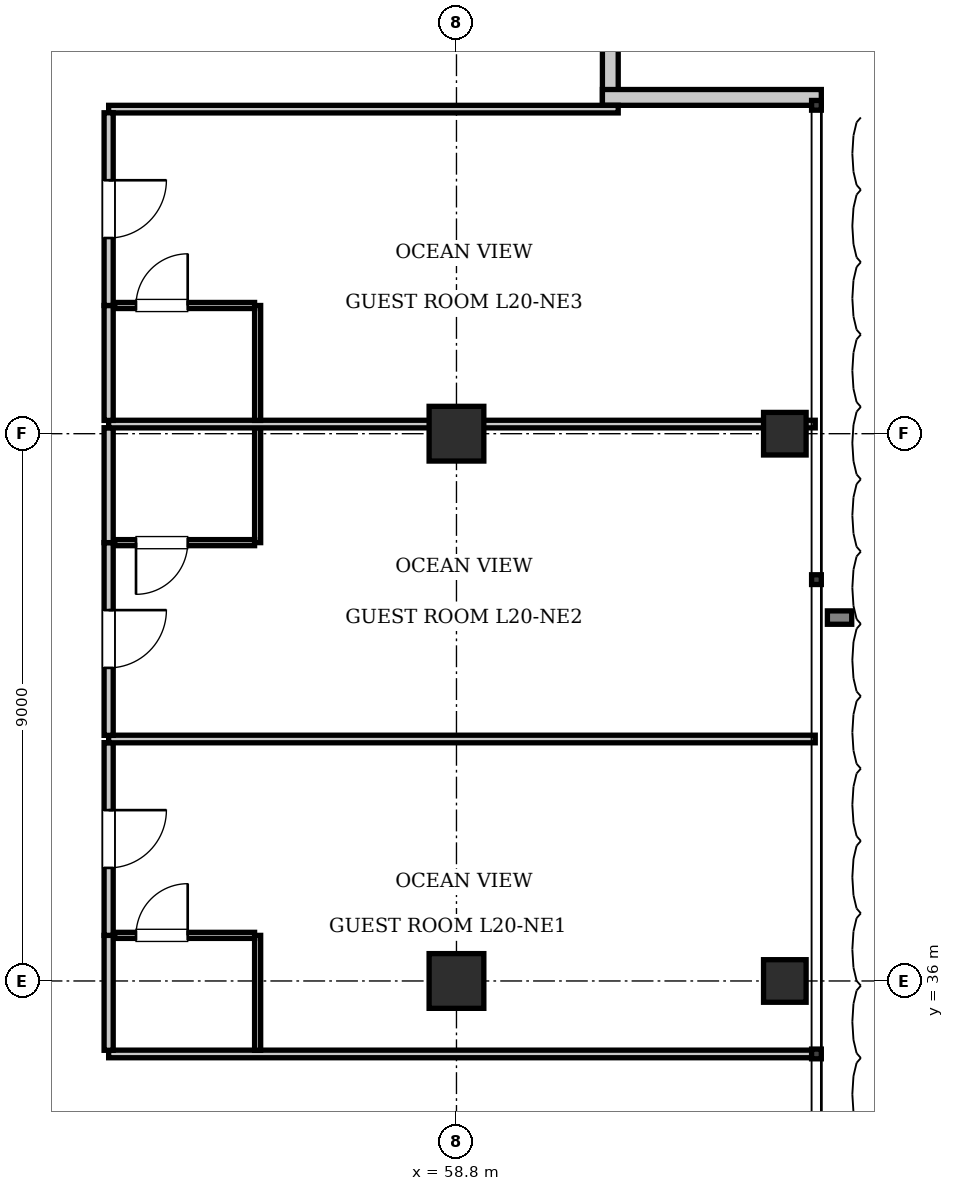
"""IFC4 building model, lengths in metres.
Left out: names, types, materials, properties, quantities, classifications, styles, units other than length and angle.
Written with IfcOpenShell. Run it as: python <this file> out.ifc"""

import sys

from ifc_helpers import new_model, si_unit, direction, frame, frame_2d, origin, origin_2d, place, context, subcontext, project, spatial, rectangle, i_section, extrude, element, fill, save


model = new_model("IFC4")
c1 = context("Model", 3, precision=1e-05, world=origin(), true_north=direction((0.0, 1.0)))
c2 = subcontext(c1, "Body", "Model", "MODEL_VIEW")
j1 = project(units=[si_unit("LENGTHUNIT", "METRE"), si_unit("PLANEANGLEUNIT", "RADIAN")], contexts=[c1])
p1 = place(None, origin())
s1 = spatial("IfcSite", under=j1, at=p1, CompositionType="ELEMENT")
p2 = place(p1, origin())
s2 = spatial("IfcBuilding", under=s1, at=p2, CompositionType="ELEMENT")
p3 = place(p2, frame((0.0, 0.0, 84.7)))
s3 = spatial("IfcBuildingStorey", under=s2, at=p3, CompositionType="ELEMENT", Elevation=84.7)
for number, where, z_axis, x_axis in (
    (1, (58.8, 36.0, 0.0), (0.0, 0.0, 1.0), (1.0, 0.0, 0.0)),
    (2, (58.8, 45.0, 0.0), (0.0, 0.0, 1.0), (1.0, 0.0, 0.0)),
):
    element("IfcColumn", number, at=place(p3, frame(where, z_axis=z_axis, x_axis=x_axis)), inside=s3, PredefinedType="COLUMN", context=c2, shape_type="SweptSolid", body=[
        extrude(rectangle(XDim=0.9, YDim=0.9, at=origin_2d()), origin(), (0.0, 0.0, 1.0), 3.85),
    ])
for number, where, z_axis, x_axis in (
    (3, (64.2, 36.0, 0.0), (0.0, 0.0, 1.0), (1.0, 0.0, 0.0)),
    (4, (64.2, 45.0, 0.0), (0.0, 0.0, 1.0), (1.0, 0.0, 0.0)),
):
    element("IfcColumn", number, at=place(p3, frame(where, z_axis=z_axis, x_axis=x_axis)), inside=s3, PredefinedType="COLUMN", context=c2, shape_type="SweptSolid", body=[
        extrude(i_section(OverallWidth=0.7, OverallDepth=0.7, WebThickness=0.028, FlangeThickness=0.044, at=origin_2d()), origin(), (0.0, 0.0, 1.0), 3.85),
    ])
for number, where, z_axis, x_axis in (
    (5, (61.33, 54.0, 0.0), (0.0, 0.0, 1.0), (0.0, -1.0, 0.0)),
    (6, (61.2, 50.53, 0.0), (0.0, 0.0, 1.0), (1.0, 0.0, 0.0)),
):
    element("IfcWall", number, at=place(p3, frame(where, z_axis=z_axis, x_axis=x_axis)), inside=s3, PredefinedType="SOLIDWALL", context=c2, shape_type="SweptSolid", body=[
        extrude(rectangle(XDim=3.6, YDim=0.26, at=frame_2d((1.8, 0.0))), origin(), (0.0, 0.0, 1.0), 3.61),
    ])
p4 = place(p3, frame((53.08, 34.8, 0.0), z_axis=(0.0, 0.0, 1.0), x_axis=(1.0, 0.0, 0.0)))
e7 = element("IfcWall", 7, at=p4, inside=s3, PredefinedType="PARTITIONING", context=c2, shape_type="SweptSolid", body=[
    extrude(rectangle(XDim=11.62, YDim=0.125, at=frame_2d((5.81, 0.0))), origin(), (0.0, 0.0, 1.0), 3.61),
])
p5 = place(p3, frame((53.08, 50.337, 0.0), z_axis=(0.0, 0.0, 1.0), x_axis=(1.0, 0.0, 0.0)))
e8 = element("IfcWall", 8, at=p5, inside=s3, PredefinedType="PARTITIONING", context=c2, shape_type="SweptSolid", body=[
    extrude(rectangle(XDim=8.38, YDim=0.125, at=frame_2d((4.19, 0.0))), origin(), (0.0, 0.0, 1.0), 3.61),
])
p6 = place(p3, frame((53.08, 34.86, 0.0), z_axis=(0.0, 0.0, 1.0), x_axis=(0.0, 1.0, 0.0)))
e9 = element("IfcWall", 9, at=p6, inside=s3, PredefinedType="PARTITIONING", context=c2, shape_type="SweptSolid", body=[
    extrude(rectangle(XDim=1.89, YDim=0.15, at=frame_2d((0.945, 0.0))), origin(), (0.0, 0.0, 1.0), 3.61),
])
p7 = place(p3, frame((53.08, 36.75, 0.0), z_axis=(0.0, 0.0, 1.0), x_axis=(0.0, 1.0, 0.0)))
e10 = element("IfcWall", 10, at=p7, inside=s3, PredefinedType="PARTITIONING", context=c2, shape_type="SweptSolid", body=[
    extrude(rectangle(XDim=3.169, YDim=0.15, at=frame_2d((1.584, 0.0))), origin(), (0.0, 0.0, 1.0), 3.61),
])
p8 = place(p7, frame((1.11, 0.0, 0.0)))
e11 = element("IfcOpeningElement", 11, at=p8, cuts=e10, PredefinedType="OPENING", context=c2, shape_type="SweptSolid", body=[
    extrude(rectangle(XDim=0.95, YDim=2.15, at=frame_2d((0.475, 1.075))), frame((0.0, 0.085, 0.0), z_axis=(0.0, -1.0, 0.0), x_axis=(1.0, 0.0, 0.0)), (0.0, 0.0, 1.0), 0.17),
])
p9 = place(p3, frame((55.53, 34.86, 0.0), z_axis=(0.0, 0.0, 1.0), x_axis=(0.0, 1.0, 0.0)))
e12 = element("IfcWall", 12, at=p9, inside=s3, PredefinedType="PARTITIONING", context=c2, shape_type="SweptSolid", body=[
    extrude(rectangle(XDim=1.89, YDim=0.1, at=frame_2d((0.945, 0.0))), origin(), (0.0, 0.0, 1.0), 3.61),
])
p10 = place(p3, frame((53.18, 36.75, 0.0), z_axis=(0.0, 0.0, 1.0), x_axis=(1.0, 0.0, 0.0)))
e13 = element("IfcWall", 13, at=p10, inside=s3, PredefinedType="PARTITIONING", context=c2, shape_type="SweptSolid", body=[
    extrude(rectangle(XDim=2.3, YDim=0.1, at=frame_2d((1.15, 0.0))), origin(), (0.0, 0.0, 1.0), 3.61),
])
p11 = place(p10, frame((0.35, 0.0, 0.0)))
e14 = element("IfcOpeningElement", 14, at=p11, cuts=e13, PredefinedType="OPENING", context=c2, shape_type="SweptSolid", body=[
    extrude(rectangle(XDim=0.85, YDim=2.1, at=frame_2d((0.425, 1.05))), frame((0.0, 0.06, 0.0), z_axis=(0.0, -1.0, 0.0), x_axis=(1.0, 0.0, 0.0)), (0.0, 0.0, 1.0), 0.12),
])
p12 = place(p3, frame((53.08, 39.979, 0.0), z_axis=(0.0, 0.0, 1.0), x_axis=(1.0, 0.0, 0.0)))
e15 = element("IfcWall", 15, at=p12, inside=s3, PredefinedType="PARTITIONING", context=c2, shape_type="SweptSolid", body=[
    extrude(rectangle(XDim=11.62, YDim=0.125, at=frame_2d((5.81, 0.0))), origin(), (0.0, 0.0, 1.0), 3.61),
])
p13 = place(p3, frame((53.08, 40.039, 0.0), z_axis=(0.0, 0.0, 1.0), x_axis=(0.0, 1.0, 0.0)))
e16 = element("IfcWall", 16, at=p13, inside=s3, PredefinedType="PARTITIONING", context=c2, shape_type="SweptSolid", body=[
    extrude(rectangle(XDim=3.169, YDim=0.15, at=frame_2d((1.584, 0.0))), origin(), (0.0, 0.0, 1.0), 3.61),
])
p14 = place(p13, frame((1.11, 0.0, 0.0)))
e17 = element("IfcOpeningElement", 17, at=p14, cuts=e16, PredefinedType="OPENING", context=c2, shape_type="SweptSolid", body=[
    extrude(rectangle(XDim=0.95, YDim=2.15, at=frame_2d((0.475, 1.075))), frame((0.0, 0.085, 0.0), z_axis=(0.0, -1.0, 0.0), x_axis=(1.0, 0.0, 0.0)), (0.0, 0.0, 1.0), 0.17),
])
p15 = place(p3, frame((53.08, 43.208, 0.0), z_axis=(0.0, 0.0, 1.0), x_axis=(0.0, 1.0, 0.0)))
e18 = element("IfcWall", 18, at=p15, inside=s3, PredefinedType="PARTITIONING", context=c2, shape_type="SweptSolid", body=[
    extrude(rectangle(XDim=1.89, YDim=0.15, at=frame_2d((0.945, 0.0))), origin(), (0.0, 0.0, 1.0), 3.61),
])
p16 = place(p3, frame((55.53, 43.208, 0.0), z_axis=(0.0, 0.0, 1.0), x_axis=(0.0, 1.0, 0.0)))
e19 = element("IfcWall", 19, at=p16, inside=s3, PredefinedType="PARTITIONING", context=c2, shape_type="SweptSolid", body=[
    extrude(rectangle(XDim=1.89, YDim=0.1, at=frame_2d((0.945, 0.0))), origin(), (0.0, 0.0, 1.0), 3.61),
])
p17 = place(p3, frame((53.18, 43.208, 0.0), z_axis=(0.0, 0.0, 1.0), x_axis=(1.0, 0.0, 0.0)))
e20 = element("IfcWall", 20, at=p17, inside=s3, PredefinedType="PARTITIONING", context=c2, shape_type="SweptSolid", body=[
    extrude(rectangle(XDim=2.3, YDim=0.1, at=frame_2d((1.15, 0.0))), origin(), (0.0, 0.0, 1.0), 3.61),
])
p18 = place(p17, frame((0.35, 0.0, 0.0)))
e21 = element("IfcOpeningElement", 21, at=p18, cuts=e20, PredefinedType="OPENING", context=c2, shape_type="SweptSolid", body=[
    extrude(rectangle(XDim=0.85, YDim=2.1, at=frame_2d((0.425, 1.05))), frame((0.0, 0.06, 0.0), z_axis=(0.0, -1.0, 0.0), x_axis=(1.0, 0.0, 0.0)), (0.0, 0.0, 1.0), 0.12),
])
p19 = place(p3, frame((53.08, 45.158, 0.0), z_axis=(0.0, 0.0, 1.0), x_axis=(1.0, 0.0, 0.0)))
e22 = element("IfcWall", 22, at=p19, inside=s3, PredefinedType="PARTITIONING", context=c2, shape_type="SweptSolid", body=[
    extrude(rectangle(XDim=11.62, YDim=0.125, at=frame_2d((5.81, 0.0))), origin(), (0.0, 0.0, 1.0), 2.999),
])
p20 = place(p3, frame((53.08, 45.218, 0.0), z_axis=(0.0, 0.0, 1.0), x_axis=(0.0, 1.0, 0.0)))
e23 = element("IfcWall", 23, at=p20, inside=s3, PredefinedType="PARTITIONING", context=c2, shape_type="SweptSolid", body=[
    extrude(rectangle(XDim=1.89, YDim=0.15, at=frame_2d((0.945, 0.0))), origin(), (0.0, 0.0, 1.0), 3.61),
])
p21 = place(p3, frame((53.08, 47.108, 0.0), z_axis=(0.0, 0.0, 1.0), x_axis=(0.0, 1.0, 0.0)))
e24 = element("IfcWall", 24, at=p21, inside=s3, PredefinedType="PARTITIONING", context=c2, shape_type="SweptSolid", body=[
    extrude(rectangle(XDim=3.169, YDim=0.15, at=frame_2d((1.584, 0.0))), origin(), (0.0, 0.0, 1.0), 3.61),
])
p22 = place(p21, frame((1.11, 0.0, 0.0)))
e25 = element("IfcOpeningElement", 25, at=p22, cuts=e24, PredefinedType="OPENING", context=c2, shape_type="SweptSolid", body=[
    extrude(rectangle(XDim=0.95, YDim=2.15, at=frame_2d((0.475, 1.075))), frame((0.0, 0.085, 0.0), z_axis=(0.0, -1.0, 0.0), x_axis=(1.0, 0.0, 0.0)), (0.0, 0.0, 1.0), 0.17),
])
p23 = place(p3, frame((55.53, 45.218, 0.0), z_axis=(0.0, 0.0, 1.0), x_axis=(0.0, 1.0, 0.0)))
e26 = element("IfcWall", 26, at=p23, inside=s3, PredefinedType="PARTITIONING", context=c2, shape_type="SweptSolid", body=[
    extrude(rectangle(XDim=1.89, YDim=0.1, at=frame_2d((0.945, 0.0))), origin(), (0.0, 0.0, 1.0), 3.61),
])
p24 = place(p3, frame((53.18, 47.108, 0.0), z_axis=(0.0, 0.0, 1.0), x_axis=(1.0, 0.0, 0.0)))
e27 = element("IfcWall", 27, at=p24, inside=s3, PredefinedType="PARTITIONING", context=c2, shape_type="SweptSolid", body=[
    extrude(rectangle(XDim=2.3, YDim=0.1, at=frame_2d((1.15, 0.0))), origin(), (0.0, 0.0, 1.0), 3.61),
])
p25 = place(p24, frame((0.35, 0.0, 0.0)))
e28 = element("IfcOpeningElement", 28, at=p25, cuts=e27, PredefinedType="OPENING", context=c2, shape_type="SweptSolid", body=[
    extrude(rectangle(XDim=0.85, YDim=2.1, at=frame_2d((0.425, 1.05))), frame((0.0, 0.06, 0.0), z_axis=(0.0, -1.0, 0.0), x_axis=(1.0, 0.0, 0.0)), (0.0, 0.0, 1.0), 0.12),
])
p26 = place(p11, origin())
e29 = element("IfcDoor", 29, at=p26, inside=s3, OperationType="SINGLE_SWING_RIGHT", PredefinedType="DOOR", context=c2, shape_type="SweptSolid", body=[
    extrude(rectangle(XDim=0.85, YDim=2.1, at=frame_2d((0.425, 1.05))), frame((0.0, 0.025, 0.0), z_axis=(0.0, -1.0, 0.0), x_axis=(1.0, 0.0, 0.0)), (0.0, 0.0, 1.0), 0.05),
])
fill(e14, e29)
p27 = place(p8, frame((0.95, 0.0, 0.0), z_axis=(0.0, 0.0, 1.0), x_axis=(-1.0, 0.0, 0.0)))
e30 = element("IfcDoor", 30, at=p27, inside=s3, OperationType="SINGLE_SWING_LEFT", PredefinedType="DOOR", context=c2, shape_type="SweptSolid", body=[
    extrude(rectangle(XDim=0.95, YDim=2.15, at=frame_2d((0.475, 1.075))), frame((0.0, 0.025, 0.0), z_axis=(0.0, -1.0, 0.0), x_axis=(1.0, 0.0, 0.0)), (0.0, 0.0, 1.0), 0.05),
])
fill(e11, e30)
p28 = place(p18, frame((0.85, 0.0, 0.0), z_axis=(0.0, 0.0, 1.0), x_axis=(-1.0, 0.0, 0.0)))
e31 = element("IfcDoor", 31, at=p28, inside=s3, OperationType="SINGLE_SWING_RIGHT", PredefinedType="DOOR", context=c2, shape_type="SweptSolid", body=[
    extrude(rectangle(XDim=0.85, YDim=2.1, at=frame_2d((0.425, 1.05))), frame((0.0, 0.025, 0.0), z_axis=(0.0, -1.0, 0.0), x_axis=(1.0, 0.0, 0.0)), (0.0, 0.0, 1.0), 0.05),
])
fill(e21, e31)
p29 = place(p14, frame((0.95, 0.0, 0.0), z_axis=(0.0, 0.0, 1.0), x_axis=(-1.0, 0.0, 0.0)))
e32 = element("IfcDoor", 32, at=p29, inside=s3, OperationType="SINGLE_SWING_LEFT", PredefinedType="DOOR", context=c2, shape_type="SweptSolid", body=[
    extrude(rectangle(XDim=0.95, YDim=2.15, at=frame_2d((0.475, 1.075))), frame((0.0, 0.025, 0.0), z_axis=(0.0, -1.0, 0.0), x_axis=(1.0, 0.0, 0.0)), (0.0, 0.0, 1.0), 0.05),
])
fill(e17, e32)
p30 = place(p25, origin())
e33 = element("IfcDoor", 33, at=p30, inside=s3, OperationType="SINGLE_SWING_RIGHT", PredefinedType="DOOR", context=c2, shape_type="SweptSolid", body=[
    extrude(rectangle(XDim=0.85, YDim=2.1, at=frame_2d((0.425, 1.05))), frame((0.0, 0.025, 0.0), z_axis=(0.0, -1.0, 0.0), x_axis=(1.0, 0.0, 0.0)), (0.0, 0.0, 1.0), 0.05),
])
fill(e28, e33)
p31 = place(p22, frame((0.95, 0.0, 0.0), z_axis=(0.0, 0.0, 1.0), x_axis=(-1.0, 0.0, 0.0)))
e34 = element("IfcDoor", 34, at=p31, inside=s3, OperationType="SINGLE_SWING_LEFT", PredefinedType="DOOR", context=c2, shape_type="SweptSolid", body=[
    extrude(rectangle(XDim=0.95, YDim=2.15, at=frame_2d((0.475, 1.075))), frame((0.0, 0.025, 0.0), z_axis=(0.0, -1.0, 0.0), x_axis=(1.0, 0.0, 0.0)), (0.0, 0.0, 1.0), 0.05),
])
fill(e25, e34)
save(model, sys.argv[1])
